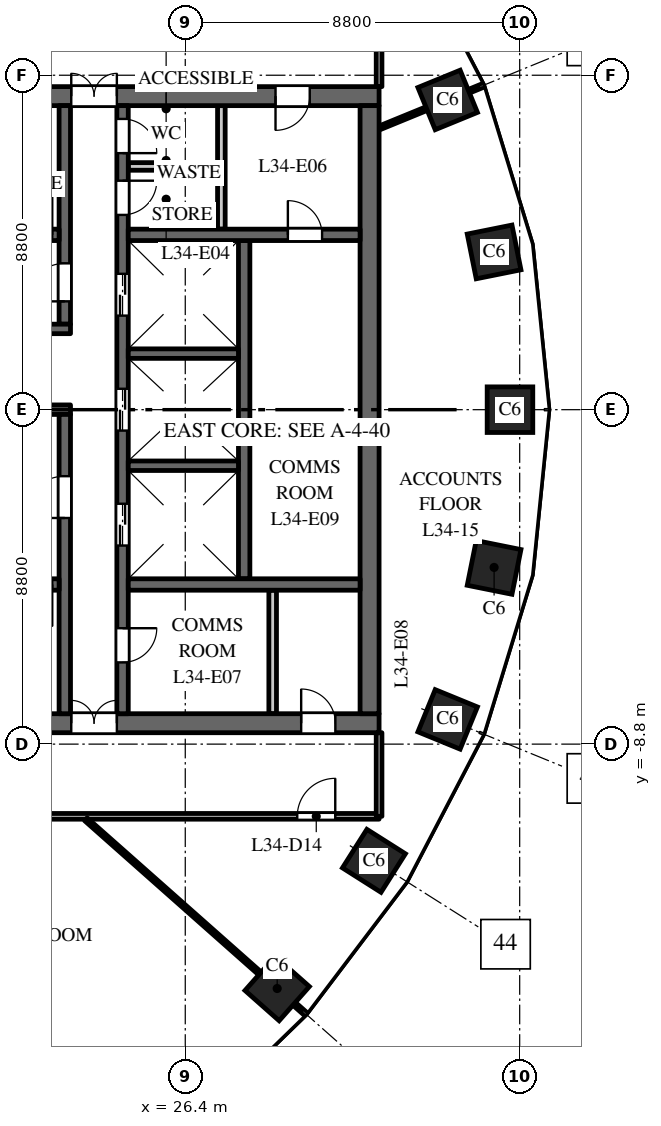
"""IFC4 building model, lengths in metres.
Left out: names, types, materials, properties, quantities, classifications, styles, units other than length and angle.
Written with IfcOpenShell. Run it as: python <this file> out.ifc"""

import sys

from ifc_helpers import new_model, si_unit, direction, frame, frame_2d, origin, origin_2d, place, context, subcontext, project, spatial, rectangle, extrude, element, fill, save


model = new_model("IFC4")
c1 = context("Model", 3, precision=1e-05, world=origin(), true_north=direction((0.0, 1.0)))
c2 = subcontext(c1, "Body", "Model", "MODEL_VIEW")
j1 = project(units=[si_unit("LENGTHUNIT", "METRE"), si_unit("PLANEANGLEUNIT", "RADIAN")], contexts=[c1])
p1 = place(None, origin())
s1 = spatial("IfcSite", under=j1, at=p1, CompositionType="ELEMENT")
p2 = place(p1, origin())
s2 = spatial("IfcBuilding", under=s1, at=p2, CompositionType="ELEMENT")
p3 = place(p2, frame((0.0, 0.0, 150.0)))
s3 = spatial("IfcBuildingStorey", under=s2, at=p3, CompositionType="ELEMENT", Elevation=150.0)
for number, where, z_axis, x_axis in (
    (1, (34.945, 0.0, 0.0), (0.0, 0.0, 1.0), (0.0, 1.0, 0.0)),
    (2, (34.527, 4.151, 0.0), (0.0, 0.0, 1.0), (-0.197, 0.98, 0.0)),
    (3, (33.305, 8.149, 0.0), (0.0, 0.0, 1.0), (-0.379, 0.925, 0.0)),
    (4, (28.819, -15.23, 0.0), (0.0, 0.0, 1.0), (0.663, 0.749, 0.0)),
    (5, (31.365, -11.871, 0.0), (0.0, 0.0, 1.0), (0.535, 0.845, 0.0)),
    (6, (33.305, -8.149, 0.0), (0.0, 0.0, 1.0), (0.379, 0.925, 0.0)),
    (7, (34.527, -4.151, 0.0), (0.0, 0.0, 1.0), (0.197, 0.98, 0.0)),
):
    element("IfcColumn", number, at=place(p3, frame(where, z_axis=z_axis, x_axis=x_axis)), inside=s3, PredefinedType="COLUMN", context=c2, shape_type="SweptSolid", body=[
        extrude(rectangle(XDim=1.2, YDim=1.2, at=origin_2d()), origin(), (0.0, 0.0, 1.0), 4.0),
    ])
p4 = place(p3, frame((16.5, 8.25, 0.0), z_axis=(0.0, 0.0, 1.0), x_axis=(1.0, 0.0, 0.0)))
e8 = element("IfcWall", 8, at=p4, inside=s3, PredefinedType="SHEAR", context=c2, shape_type="SweptSolid", body=[
    extrude(rectangle(XDim=15.0, YDim=0.5, at=frame_2d((7.5, 0.0))), origin(), (0.0, 0.0, 1.0), 3.7),
])
p5 = place(p4, frame((6.9, 0.0, 0.0)))
e9 = element("IfcOpeningElement", 9, at=p5, cuts=e8, PredefinedType="OPENING", context=c2, shape_type="SweptSolid", body=[
    extrude(rectangle(XDim=1.2, YDim=2.1, at=frame_2d((0.6, 1.05))), frame((0.0, 0.26, 0.0), z_axis=(0.0, -1.0, 0.0), x_axis=(1.0, 0.0, 0.0)), (0.0, 0.0, 1.0), 0.52),
])
p6 = place(p4, frame((12.275, 0.0, 0.0)))
e10 = element("IfcOpeningElement", 10, at=p6, cuts=e8, PredefinedType="OPENING", context=c2, shape_type="SweptSolid", body=[
    extrude(rectangle(XDim=0.9, YDim=2.1, at=frame_2d((0.45, 1.05))), frame((0.0, 0.26, 0.0), z_axis=(0.0, -1.0, 0.0), x_axis=(1.0, 0.0, 0.0)), (0.0, 0.0, 1.0), 0.52),
])
p7 = place(p3, frame((16.5, -8.25, 0.0), z_axis=(0.0, 0.0, 1.0), x_axis=(1.0, 0.0, 0.0)))
e11 = element("IfcWall", 11, at=p7, inside=s3, PredefinedType="SHEAR", context=c2, shape_type="SweptSolid", body=[
    extrude(rectangle(XDim=15.0, YDim=0.5, at=frame_2d((7.5, 0.0))), origin(), (0.0, 0.0, 1.0), 3.7),
])
p8 = place(p7, frame((6.9, 0.0, 0.0)))
e12 = element("IfcOpeningElement", 12, at=p8, cuts=e11, PredefinedType="OPENING", context=c2, shape_type="SweptSolid", body=[
    extrude(rectangle(XDim=1.2, YDim=2.1, at=frame_2d((0.6, 1.05))), frame((0.0, 0.26, 0.0), z_axis=(0.0, -1.0, 0.0), x_axis=(1.0, 0.0, 0.0)), (0.0, 0.0, 1.0), 0.52),
])
p9 = place(p7, frame((12.95, 0.0, 0.0)))
e13 = element("IfcOpeningElement", 13, at=p9, cuts=e11, PredefinedType="OPENING", context=c2, shape_type="SweptSolid", body=[
    extrude(rectangle(XDim=0.9, YDim=2.1, at=frame_2d((0.45, 1.05))), frame((0.0, 0.26, 0.0), z_axis=(0.0, -1.0, 0.0), x_axis=(1.0, 0.0, 0.0)), (0.0, 0.0, 1.0), 0.52),
])
p10 = place(p3, frame((27.95, -4.45, 0.0), z_axis=(0.0, 0.0, 1.0), x_axis=(0.0, 1.0, 0.0)))
e14 = element("IfcWall", 14, at=p10, inside=s3, PredefinedType="SHEAR", context=c2, shape_type="SweptSolid", body=[
    extrude(rectangle(XDim=8.9, YDim=0.3, at=frame_2d((4.45, 0.0))), origin(), (0.0, 0.0, 1.0), 3.7),
])
p11 = place(p3, frame((24.75, -8.0, 0.0), z_axis=(0.0, 0.0, 1.0), x_axis=(0.0, 1.0, 0.0)))
e15 = element("IfcWall", 15, at=p11, inside=s3, PredefinedType="SHEAR", context=c2, shape_type="SweptSolid", body=[
    extrude(rectangle(XDim=16.0, YDim=0.3, at=frame_2d((8.0, 0.0))), origin(), (0.0, 0.0, 1.0), 3.7),
])
p12 = place(p11, frame((4.425, 0.0, 0.0)))
e16 = element("IfcOpeningElement", 16, at=p12, cuts=e15, PredefinedType="OPENING", context=c2, shape_type="SweptSolid", body=[
    extrude(rectangle(XDim=1.1, YDim=2.1, at=frame_2d((0.55, 1.05))), frame((0.0, 0.16, 0.0), z_axis=(0.0, -1.0, 0.0), x_axis=(1.0, 0.0, 0.0)), (0.0, 0.0, 1.0), 0.32),
])
p13 = place(p11, frame((7.45, 0.0, 0.0)))
e17 = element("IfcOpeningElement", 17, at=p13, cuts=e15, PredefinedType="OPENING", context=c2, shape_type="SweptSolid", body=[
    extrude(rectangle(XDim=1.1, YDim=2.1, at=frame_2d((0.55, 1.05))), frame((0.0, 0.16, 0.0), z_axis=(0.0, -1.0, 0.0), x_axis=(1.0, 0.0, 0.0)), (0.0, 0.0, 1.0), 0.32),
])
p14 = place(p11, frame((10.475, 0.0, 0.0)))
e18 = element("IfcOpeningElement", 18, at=p14, cuts=e15, PredefinedType="OPENING", context=c2, shape_type="SweptSolid", body=[
    extrude(rectangle(XDim=1.1, YDim=2.1, at=frame_2d((0.55, 1.05))), frame((0.0, 0.16, 0.0), z_axis=(0.0, -1.0, 0.0), x_axis=(1.0, 0.0, 0.0)), (0.0, 0.0, 1.0), 0.32),
])
p15 = place(p11, frame((13.125, 0.0, 0.0)))
e19 = element("IfcOpeningElement", 19, at=p15, cuts=e15, PredefinedType="OPENING", context=c2, shape_type="SweptSolid", body=[
    extrude(rectangle(XDim=0.9, YDim=2.1, at=frame_2d((0.45, 1.05))), frame((0.0, 0.16, 0.0), z_axis=(0.0, -1.0, 0.0), x_axis=(1.0, 0.0, 0.0)), (0.0, 0.0, 1.0), 0.32),
])
p16 = place(p11, frame((14.75, 0.0, 0.0)))
e20 = element("IfcOpeningElement", 20, at=p16, cuts=e15, PredefinedType="OPENING", context=c2, shape_type="SweptSolid", body=[
    extrude(rectangle(XDim=0.9, YDim=2.1, at=frame_2d((0.45, 1.05))), frame((0.0, 0.16, 0.0), z_axis=(0.0, -1.0, 0.0), x_axis=(1.0, 0.0, 0.0)), (0.0, 0.0, 1.0), 0.32),
])
p17 = place(p11, frame((1.35, 0.0, 0.0)))
e21 = element("IfcOpeningElement", 21, at=p17, cuts=e15, PredefinedType="OPENING", context=c2, shape_type="SweptSolid", body=[
    extrude(rectangle(XDim=0.9, YDim=2.1, at=frame_2d((0.45, 1.05))), frame((0.0, 0.16, 0.0), z_axis=(0.0, -1.0, 0.0), x_axis=(1.0, 0.0, 0.0)), (0.0, 0.0, 1.0), 0.32),
])
p18 = place(p3, frame((20.1, 0.0, 0.0), z_axis=(0.0, 0.0, 1.0), x_axis=(1.0, 0.0, 0.0)))
e22 = element("IfcWall", 22, at=p18, inside=s3, PredefinedType="SHEAR", context=c2, shape_type="SweptSolid", body=[
    extrude(rectangle(XDim=3.28, YDim=0.25, at=frame_2d((1.64, 0.0))), origin(), (0.0, 0.0, 1.0), 3.7),
])
p19 = place(p3, frame((31.25, -8.0, 0.0), z_axis=(0.0, 0.0, 1.0), x_axis=(0.0, 1.0, 0.0)))
e23 = element("IfcWall", 23, at=p19, inside=s3, PredefinedType="SHEAR", context=c2, shape_type="SweptSolid", body=[
    extrude(rectangle(XDim=16.0, YDim=0.5, at=frame_2d((8.0, 0.0))), origin(), (0.0, 0.0, 1.0), 3.7),
])
p20 = place(p3, frame((24.9, 4.6, 0.0), z_axis=(0.0, 0.0, 1.0), x_axis=(1.0, 0.0, 0.0)))
e24 = element("IfcWall", 24, at=p20, inside=s3, PredefinedType="SHEAR", context=c2, shape_type="SweptSolid", body=[
    extrude(rectangle(XDim=6.1, YDim=0.3, at=frame_2d((3.05, 0.0))), origin(), (0.0, 0.0, 1.0), 3.7),
])
p21 = place(p20, frame((4.2, 0.0, 0.0)))
e25 = element("IfcOpeningElement", 25, at=p21, cuts=e24, PredefinedType="OPENING", context=c2, shape_type="SweptSolid", body=[
    extrude(rectangle(XDim=0.9, YDim=2.1, at=frame_2d((0.45, 1.05))), frame((0.0, 0.16, 0.0), z_axis=(0.0, -1.0, 0.0), x_axis=(1.0, 0.0, 0.0)), (0.0, 0.0, 1.0), 0.32),
])
for number, where, z_axis, x_axis in (
    (26, (27.35, 4.75, 0.0), (0.0, 0.0, 1.0), (0.0, 1.0, 0.0)),
    (27, (28.7, -8.0, 0.0), (0.0, 0.0, 1.0), (0.0, 1.0, 0.0)),
):
    element("IfcWall", number, at=place(p3, frame(where, z_axis=z_axis, x_axis=x_axis)), inside=s3, PredefinedType="PARTITIONING", context=c2, shape_type="SweptSolid", body=[
        extrude(rectangle(XDim=3.25, YDim=0.2, at=frame_2d((1.625, 0.0))), origin(), (0.0, 0.0, 1.0), 3.7),
    ])
p22 = place(p3, frame((24.9, 6.4, 0.0), z_axis=(0.0, 0.0, 1.0), x_axis=(1.0, 0.0, 0.0)))
e28 = element("IfcWall", 28, at=p22, inside=s3, PredefinedType="PARTITIONING", context=c2, shape_type="SweptSolid", body=[
    extrude(rectangle(XDim=2.35, YDim=0.2, at=frame_2d((1.175, 0.0))), origin(), (0.0, 0.0, 1.0), 3.7),
])
p23 = place(p3, frame((24.9, -4.6, 0.0), z_axis=(0.0, 0.0, 1.0), x_axis=(1.0, 0.0, 0.0)))
e29 = element("IfcWall", 29, at=p23, inside=s3, PredefinedType="SHEAR", context=c2, shape_type="SweptSolid", body=[
    extrude(rectangle(XDim=6.1, YDim=0.3, at=frame_2d((3.05, 0.0))), origin(), (0.0, 0.0, 1.0), 3.7),
])
for number, where, z_axis, x_axis in (
    (30, (24.9, -1.475, 0.0), (0.0, 0.0, 1.0), (1.0, 0.0, 0.0)),
    (31, (24.9, 1.475, 0.0), (0.0, 0.0, 1.0), (1.0, 0.0, 0.0)),
):
    element("IfcWall", number, at=place(p3, frame(where, z_axis=z_axis, x_axis=x_axis)), inside=s3, PredefinedType="SHEAR", context=c2, shape_type="SweptSolid", body=[
        extrude(rectangle(XDim=2.9, YDim=0.25, at=frame_2d((1.45, 0.0))), origin(), (0.0, 0.0, 1.0), 3.7),
    ])
p24 = place(p3, frame((23.23, 2.25, 0.0), z_axis=(0.0, 0.0, 1.0), x_axis=(0.0, 1.0, 0.0)))
e32 = element("IfcWall", 32, at=p24, inside=s3, PredefinedType="SHEAR", context=c2, shape_type="SweptSolid", body=[
    extrude(rectangle(XDim=5.75, YDim=0.3, at=frame_2d((2.875, 0.0))), origin(), (0.0, 0.0, 1.0), 3.7),
])
p25 = place(p24, frame((0.6, 0.0, 0.0)))
e33 = element("IfcOpeningElement", 33, at=p25, cuts=e32, PredefinedType="OPENING", context=c2, shape_type="SweptSolid", body=[
    extrude(rectangle(XDim=1.0, YDim=2.1, at=frame_2d((0.5, 1.05))), frame((0.0, 0.16, 0.0), z_axis=(0.0, -1.0, 0.0), x_axis=(1.0, 0.0, 0.0)), (0.0, 0.0, 1.0), 0.32),
])
p26 = place(p3, frame((23.23, -8.0, 0.0), z_axis=(0.0, 0.0, 1.0), x_axis=(0.0, 1.0, 0.0)))
e34 = element("IfcWall", 34, at=p26, inside=s3, PredefinedType="SHEAR", context=c2, shape_type="SweptSolid", body=[
    extrude(rectangle(XDim=7.875, YDim=0.3, at=frame_2d((3.938, 0.0))), origin(), (0.0, 0.0, 1.0), 3.7),
])
p27 = place(p26, frame((5.15, 0.0, 0.0)))
e35 = element("IfcOpeningElement", 35, at=p27, cuts=e34, PredefinedType="OPENING", context=c2, shape_type="SweptSolid", body=[
    extrude(rectangle(XDim=1.1, YDim=2.1, at=frame_2d((0.55, 1.05))), frame((0.0, 0.16, 0.0), z_axis=(0.0, -1.0, 0.0), x_axis=(1.0, 0.0, 0.0)), (0.0, 0.0, 1.0), 0.32),
])
p28 = place(p3, frame((16.9, 4.6, 0.0), z_axis=(0.0, 0.0, 1.0), x_axis=(1.0, 0.0, 0.0)))
e36 = element("IfcWall", 36, at=p28, inside=s3, PredefinedType="SHEAR", context=c2, shape_type="SweptSolid", body=[
    extrude(rectangle(XDim=6.18, YDim=0.3, at=frame_2d((3.09, 0.0))), origin(), (0.0, 0.0, 1.0), 3.7),
])
p29 = place(p28, frame((4.9, 0.0, 0.0)))
e37 = element("IfcOpeningElement", 37, at=p29, cuts=e36, PredefinedType="OPENING", context=c2, shape_type="SweptSolid", body=[
    extrude(rectangle(XDim=1.1, YDim=2.1, at=frame_2d((0.55, 1.05))), frame((0.0, 0.16, 0.0), z_axis=(0.0, -1.0, 0.0), x_axis=(1.0, 0.0, 0.0)), (0.0, 0.0, 1.0), 0.32),
])
p30 = place(p3, frame((16.9, -4.6, 0.0), z_axis=(0.0, 0.0, 1.0), x_axis=(1.0, 0.0, 0.0)))
e38 = element("IfcWall", 38, at=p30, inside=s3, PredefinedType="SHEAR", context=c2, shape_type="SweptSolid", body=[
    extrude(rectangle(XDim=6.18, YDim=0.3, at=frame_2d((3.09, 0.0))), origin(), (0.0, 0.0, 1.0), 3.7),
])
p31 = place(p30, frame((4.9, 0.0, 0.0)))
e39 = element("IfcOpeningElement", 39, at=p31, cuts=e38, PredefinedType="OPENING", context=c2, shape_type="SweptSolid", body=[
    extrude(rectangle(XDim=1.1, YDim=2.1, at=frame_2d((0.55, 1.05))), frame((0.0, 0.16, 0.0), z_axis=(0.0, -1.0, 0.0), x_axis=(1.0, 0.0, 0.0)), (0.0, 0.0, 1.0), 0.32),
])
p32 = place(p3, frame((20.85, 2.125, 0.0), z_axis=(0.0, 0.0, 1.0), x_axis=(1.0, 0.0, 0.0)))
e40 = element("IfcWall", 40, at=p32, inside=s3, PredefinedType="SHEAR", context=c2, shape_type="SweptSolid", body=[
    extrude(rectangle(XDim=2.53, YDim=0.25, at=frame_2d((1.265, 0.0))), origin(), (0.0, 0.0, 1.0), 3.7),
])
p33 = place(p3, frame((16.5, -10.7, 0.0), z_axis=(0.0, 0.0, 1.0), x_axis=(1.0, 0.0, 0.0)))
e41 = element("IfcWall", 41, at=p33, inside=s3, PredefinedType="PARTITIONING", context=c2, shape_type="SweptSolid", body=[
    extrude(rectangle(XDim=15.0, YDim=0.15, at=frame_2d((7.5, 0.0))), origin(), (0.0, 0.0, 1.0), 2.75),
])
p34 = place(p33, frame((0.65, 0.0, 0.0)))
e42 = element("IfcOpeningElement", 42, at=p34, cuts=e41, PredefinedType="OPENING", context=c2, shape_type="SweptSolid", body=[
    extrude(rectangle(XDim=1.0, YDim=2.1, at=frame_2d((0.5, 1.05))), frame((0.0, 0.085, 0.0), z_axis=(0.0, -1.0, 0.0), x_axis=(1.0, 0.0, 0.0)), (0.0, 0.0, 1.0), 0.17),
])
p35 = place(p33, frame((12.847, 0.0, 0.0)))
e43 = element("IfcOpeningElement", 43, at=p35, cuts=e41, PredefinedType="OPENING", context=c2, shape_type="SweptSolid", body=[
    extrude(rectangle(XDim=1.0, YDim=2.1, at=frame_2d((0.5, 1.05))), frame((0.0, 0.085, 0.0), z_axis=(0.0, -1.0, 0.0), x_axis=(1.0, 0.0, 0.0)), (0.0, 0.0, 1.0), 0.17),
])
p36 = place(p3, frame((23.785, -10.778, 0.0), z_axis=(0.0, 0.0, 1.0), x_axis=(0.748616873252, -0.663002848472, 0.0)))
e44 = element("IfcWall", 44, at=p36, inside=s3, PredefinedType="PARTITIONING", context=c2, shape_type="SweptSolid", body=[
    extrude(rectangle(XDim=7.722, YDim=0.1, at=frame_2d((3.861, 0.0))), origin(), (0.0, 0.0, 1.0), 3.7),
])
p37 = place(p3, frame((31.5, -10.7, 0.0), z_axis=(0.0, 0.0, 1.0), x_axis=(0.0, 1.0, 0.0)))
e45 = element("IfcWall", 45, at=p37, inside=s3, PredefinedType="PARTITIONING", context=c2, shape_type="SweptSolid", body=[
    extrude(rectangle(XDim=2.2, YDim=0.15, at=frame_2d((1.1, 0.0))), origin(), (0.0, 0.0, 1.0), 2.9),
])
p38 = place(p3, frame((31.5, 7.41, 0.0), z_axis=(0.0, 0.0, 1.0), x_axis=(0.925344112436, 0.379128307542, 0.0)))
e46 = element("IfcWall", 46, at=p38, inside=s3, PredefinedType="PARTITIONING", context=c2, shape_type="SweptSolid", body=[
    extrude(rectangle(XDim=2.954, YDim=0.1, at=frame_2d((1.477, 0.0))), origin(), (0.0, 0.0, 1.0), 3.7),
])
p39 = place(p3, frame((31.5, 8.5, 0.0), z_axis=(0.0, 0.0, 1.0), x_axis=(0.0, 1.0, 0.0)))
e47 = element("IfcWall", 47, at=p39, inside=s3, PredefinedType="PARTITIONING", context=c2, shape_type="SweptSolid", body=[
    extrude(rectangle(XDim=2.2, YDim=0.15, at=frame_2d((1.1, 0.0))), origin(), (0.0, 0.0, 1.0), 2.9),
])
p40 = place(p12, origin())
e48 = element("IfcDoor", 48, at=p40, inside=s3, OperationType="DOUBLE_DOOR_SLIDING", PredefinedType="DOOR", context=c2, shape_type="SweptSolid", body=[
    extrude(rectangle(XDim=1.1, YDim=2.1, at=frame_2d((0.55, 1.05))), frame((0.0, 0.025, 0.0), z_axis=(0.0, -1.0, 0.0), x_axis=(1.0, 0.0, 0.0)), (0.0, 0.0, 1.0), 0.05),
])
fill(e16, e48)
p41 = place(p13, origin())
e49 = element("IfcDoor", 49, at=p41, inside=s3, OperationType="DOUBLE_DOOR_SLIDING", PredefinedType="DOOR", context=c2, shape_type="SweptSolid", body=[
    extrude(rectangle(XDim=1.1, YDim=2.1, at=frame_2d((0.55, 1.05))), frame((0.0, 0.025, 0.0), z_axis=(0.0, -1.0, 0.0), x_axis=(1.0, 0.0, 0.0)), (0.0, 0.0, 1.0), 0.05),
])
fill(e17, e49)
p42 = place(p14, origin())
e50 = element("IfcDoor", 50, at=p42, inside=s3, OperationType="DOUBLE_DOOR_SLIDING", PredefinedType="DOOR", context=c2, shape_type="SweptSolid", body=[
    extrude(rectangle(XDim=1.1, YDim=2.1, at=frame_2d((0.55, 1.05))), frame((0.0, 0.025, 0.0), z_axis=(0.0, -1.0, 0.0), x_axis=(1.0, 0.0, 0.0)), (0.0, 0.0, 1.0), 0.05),
])
fill(e18, e50)
p43 = place(p29, origin())
e51 = element("IfcDoor", 51, at=p43, inside=s3, OperationType="SINGLE_SWING_LEFT", PredefinedType="DOOR", context=c2, shape_type="SweptSolid", body=[
    extrude(rectangle(XDim=1.1, YDim=2.1, at=frame_2d((0.55, 1.05))), frame((0.0, 0.025, 0.0), z_axis=(0.0, -1.0, 0.0), x_axis=(1.0, 0.0, 0.0)), (0.0, 0.0, 1.0), 0.05),
])
fill(e37, e51)
p44 = place(p31, origin())
e52 = element("IfcDoor", 52, at=p44, inside=s3, OperationType="SINGLE_SWING_RIGHT", PredefinedType="DOOR", context=c2, shape_type="SweptSolid", body=[
    extrude(rectangle(XDim=1.1, YDim=2.1, at=frame_2d((0.55, 1.05))), frame((0.0, 0.025, 0.0), z_axis=(0.0, -1.0, 0.0), x_axis=(1.0, 0.0, 0.0)), (0.0, 0.0, 1.0), 0.05),
])
fill(e39, e52)
p45 = place(p27, origin())
e53 = element("IfcDoor", 53, at=p45, inside=s3, OperationType="SINGLE_SWING_RIGHT", PredefinedType="DOOR", context=c2, shape_type="SweptSolid", body=[
    extrude(rectangle(XDim=1.1, YDim=2.1, at=frame_2d((0.55, 1.05))), frame((0.0, 0.025, 0.0), z_axis=(0.0, -1.0, 0.0), x_axis=(1.0, 0.0, 0.0)), (0.0, 0.0, 1.0), 0.05),
])
fill(e35, e53)
p46 = place(p25, origin())
e54 = element("IfcDoor", 54, at=p46, inside=s3, OperationType="SINGLE_SWING_RIGHT", PredefinedType="DOOR", context=c2, shape_type="SweptSolid", body=[
    extrude(rectangle(XDim=1.0, YDim=2.1, at=frame_2d((0.5, 1.05))), frame((0.0, 0.025, 0.0), z_axis=(0.0, -1.0, 0.0), x_axis=(1.0, 0.0, 0.0)), (0.0, 0.0, 1.0), 0.05),
])
fill(e33, e54)
p47 = place(p5, origin())
e55 = element("IfcDoor", 55, at=p47, inside=s3, OperationType="DOUBLE_DOOR_DOUBLE_SWING", PredefinedType="DOOR", context=c2, shape_type="SweptSolid", body=[
    extrude(rectangle(XDim=1.2, YDim=2.1, at=frame_2d((0.6, 1.05))), frame((0.0, 0.025, 0.0), z_axis=(0.0, -1.0, 0.0), x_axis=(1.0, 0.0, 0.0)), (0.0, 0.0, 1.0), 0.05),
])
fill(e9, e55)
p48 = place(p8, origin())
e56 = element("IfcDoor", 56, at=p48, inside=s3, OperationType="DOUBLE_DOOR_DOUBLE_SWING", PredefinedType="DOOR", context=c2, shape_type="SweptSolid", body=[
    extrude(rectangle(XDim=1.2, YDim=2.1, at=frame_2d((0.6, 1.05))), frame((0.0, 0.025, 0.0), z_axis=(0.0, -1.0, 0.0), x_axis=(1.0, 0.0, 0.0)), (0.0, 0.0, 1.0), 0.05),
])
fill(e12, e56)
p49 = place(p15, origin())
e57 = element("IfcDoor", 57, at=p49, inside=s3, OperationType="SINGLE_SWING_RIGHT", PredefinedType="DOOR", context=c2, shape_type="SweptSolid", body=[
    extrude(rectangle(XDim=0.9, YDim=2.1, at=frame_2d((0.45, 1.05))), frame((0.0, 0.025, 0.0), z_axis=(0.0, -1.0, 0.0), x_axis=(1.0, 0.0, 0.0)), (0.0, 0.0, 1.0), 0.05),
])
fill(e19, e57)
p50 = place(p16, origin())
e58 = element("IfcDoor", 58, at=p50, inside=s3, OperationType="SINGLE_SWING_LEFT", PredefinedType="DOOR", context=c2, shape_type="SweptSolid", body=[
    extrude(rectangle(XDim=0.9, YDim=2.1, at=frame_2d((0.45, 1.05))), frame((0.0, 0.025, 0.0), z_axis=(0.0, -1.0, 0.0), x_axis=(1.0, 0.0, 0.0)), (0.0, 0.0, 1.0), 0.05),
])
fill(e20, e58)
p51 = place(p6, origin())
e59 = element("IfcDoor", 59, at=p51, inside=s3, OperationType="SINGLE_SWING_LEFT", PredefinedType="DOOR", context=c2, shape_type="SweptSolid", body=[
    extrude(rectangle(XDim=0.9, YDim=2.1, at=frame_2d((0.45, 1.05))), frame((0.0, 0.025, 0.0), z_axis=(0.0, -1.0, 0.0), x_axis=(1.0, 0.0, 0.0)), (0.0, 0.0, 1.0), 0.05),
])
fill(e10, e59)
p52 = place(p17, origin())
e60 = element("IfcDoor", 60, at=p52, inside=s3, OperationType="SINGLE_SWING_RIGHT", PredefinedType="DOOR", context=c2, shape_type="SweptSolid", body=[
    extrude(rectangle(XDim=0.9, YDim=2.1, at=frame_2d((0.45, 1.05))), frame((0.0, 0.025, 0.0), z_axis=(0.0, -1.0, 0.0), x_axis=(1.0, 0.0, 0.0)), (0.0, 0.0, 1.0), 0.05),
])
fill(e21, e60)
p53 = place(p9, origin())
e61 = element("IfcDoor", 61, at=p53, inside=s3, OperationType="SINGLE_SWING_RIGHT", PredefinedType="DOOR", context=c2, shape_type="SweptSolid", body=[
    extrude(rectangle(XDim=0.9, YDim=2.1, at=frame_2d((0.45, 1.05))), frame((0.0, 0.025, 0.0), z_axis=(0.0, -1.0, 0.0), x_axis=(1.0, 0.0, 0.0)), (0.0, 0.0, 1.0), 0.05),
])
fill(e13, e61)
p54 = place(p21, origin())
e62 = element("IfcDoor", 62, at=p54, inside=s3, OperationType="SINGLE_SWING_RIGHT", PredefinedType="DOOR", context=c2, shape_type="SweptSolid", body=[
    extrude(rectangle(XDim=0.9, YDim=2.1, at=frame_2d((0.45, 1.05))), frame((0.0, 0.025, 0.0), z_axis=(0.0, -1.0, 0.0), x_axis=(1.0, 0.0, 0.0)), (0.0, 0.0, 1.0), 0.05),
])
fill(e25, e62)
p55 = place(p35, origin())
e63 = element("IfcDoor", 63, at=p55, inside=s3, OperationType="SINGLE_SWING_RIGHT", PredefinedType="DOOR", context=c2, shape_type="SweptSolid", body=[
    extrude(rectangle(XDim=1.0, YDim=2.1, at=frame_2d((0.5, 1.05))), frame((0.0, 0.025, 0.0), z_axis=(0.0, -1.0, 0.0), x_axis=(1.0, 0.0, 0.0)), (0.0, 0.0, 1.0), 0.05),
])
fill(e43, e63)
save(model, sys.argv[1])
